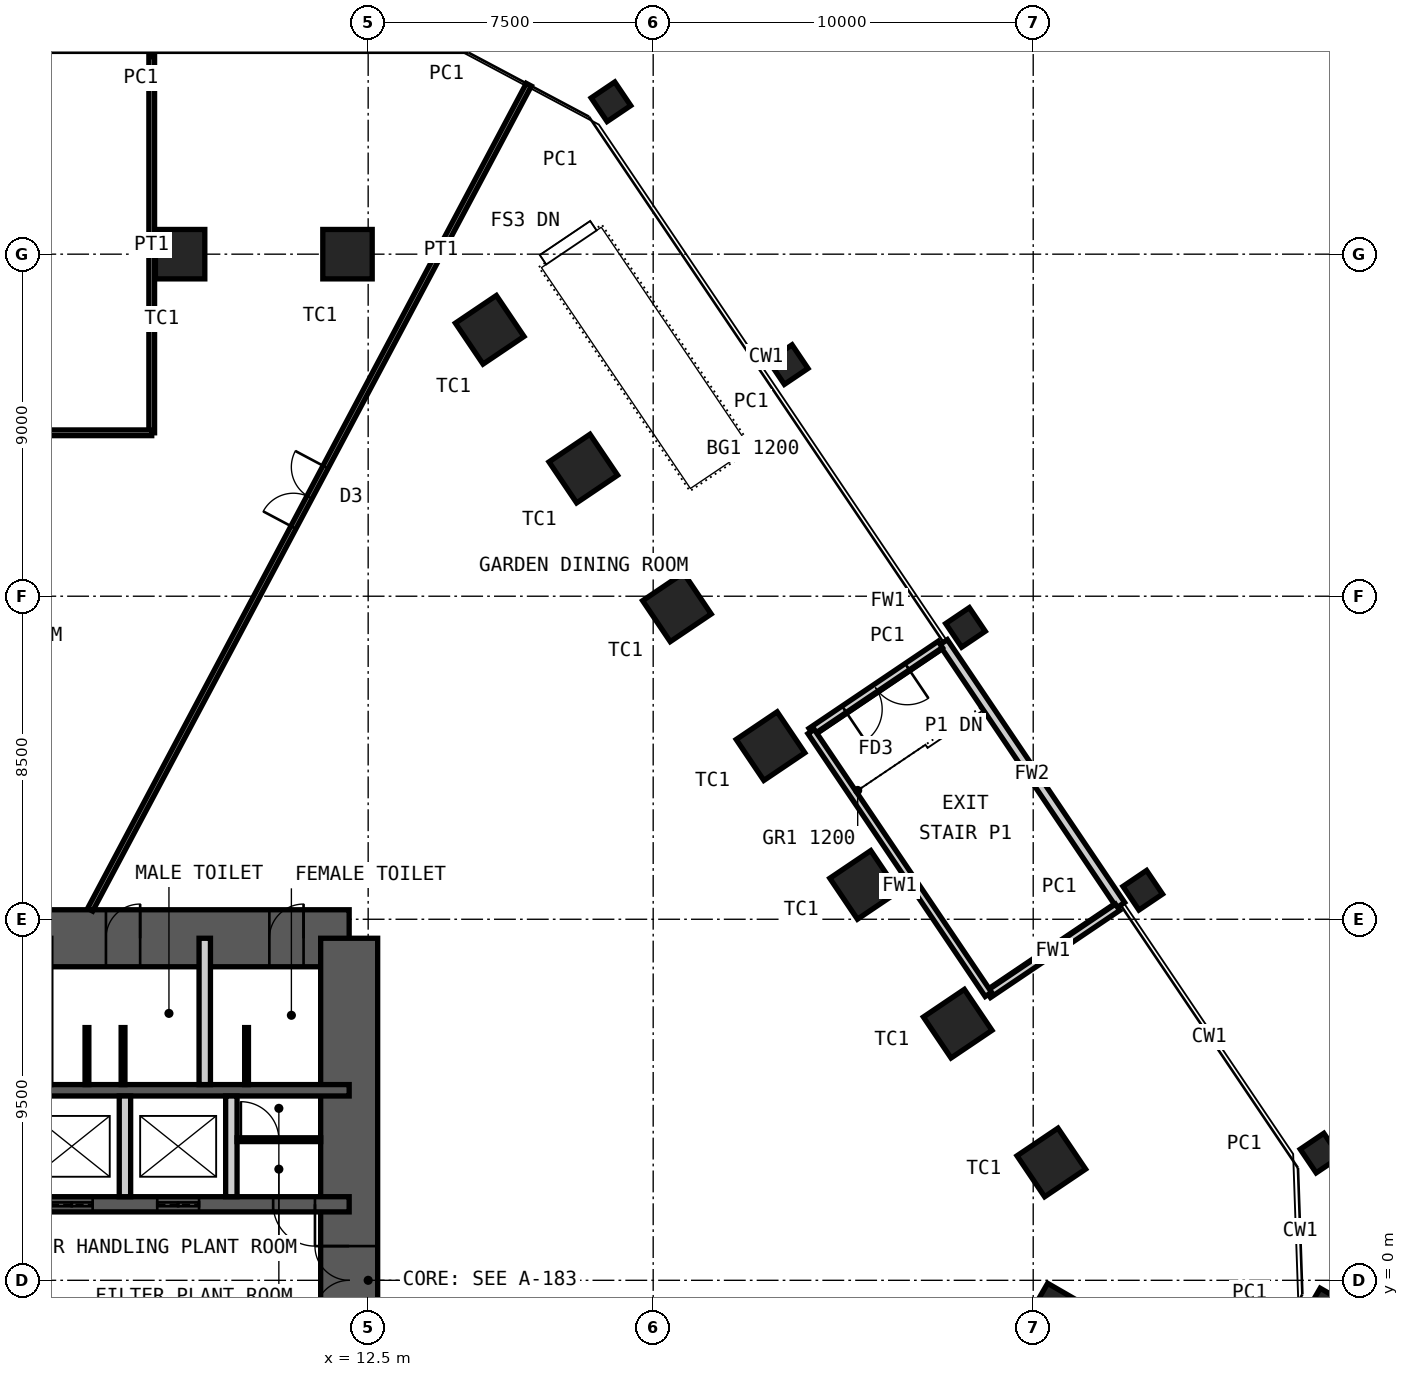
"""IFC4 building model, lengths in metres.
Left out: names, types, materials, properties, quantities, classifications, styles, units other than length and angle.
Written with IfcOpenShell. Run it as: python <this file> out.ifc"""

import sys

from ifc_helpers import new_model, si_unit, direction, frame, frame_2d, origin, origin_2d, place, context, subcontext, project, spatial, rectangle, hollow_rectangle, extrude, element, fill, save


model = new_model("IFC4")
c1 = context("Model", 3, precision=1e-05, world=origin(), true_north=direction((0.0, 1.0)))
c2 = subcontext(c1, "Body", "Model", "MODEL_VIEW")
j1 = project(units=[si_unit("LENGTHUNIT", "METRE"), si_unit("PLANEANGLEUNIT", "RADIAN")], contexts=[c1])
p1 = place(None, origin())
s1 = spatial("IfcSite", under=j1, at=p1, CompositionType="ELEMENT")
p2 = place(p1, origin())
s2 = spatial("IfcBuilding", under=s1, at=p2, CompositionType="ELEMENT")
p3 = place(p2, frame((0.0, 0.0, 12.0)))
s3 = spatial("IfcBuildingStorey", under=s2, at=p3, CompositionType="ELEMENT", Elevation=12.0)
for number, where, z_axis, x_axis in (
    (1, (7.552, 27.0, 0.0), (0.0, 0.0, 1.0), (-1.0, 0.0, 0.0)),
    (2, (11.956, 27.0, 0.0), (0.0, 0.0, 1.0), (-1.0, 0.0, 0.0)),
    (3, (15.698, 25.01, 0.0), (0.0, 0.0, 1.0), (-0.559, 0.829, 0.0)),
    (4, (18.161, 21.359, 0.0), (0.0, 0.0, 1.0), (-0.559, 0.829, 0.0)),
    (5, (20.624, 17.707, 0.0), (0.0, 0.0, 1.0), (-0.559, 0.829, 0.0)),
    (6, (23.087, 14.056, 0.0), (0.0, 0.0, 1.0), (-0.559, 0.829, 0.0)),
    (7, (25.55, 10.404, 0.0), (0.0, 0.0, 1.0), (-0.559, 0.829, 0.0)),
    (8, (28.013, 6.752, 0.0), (0.0, 0.0, 1.0), (-0.559, 0.829, 0.0)),
    (9, (30.476, 3.101, 0.0), (0.0, 0.0, 1.0), (-0.559, 0.829, 0.0)),
    (10, (30.618, -0.967, 0.0), (0.0, 0.0, 1.0), (0.5, 0.866, 0.0)),
):
    element("IfcColumn", number, at=place(p3, frame(where, z_axis=z_axis, x_axis=x_axis)), inside=s3, PredefinedType="COLUMN", context=c2, shape_type="SweptSolid", body=[
        extrude(hollow_rectangle(XDim=1.3, YDim=1.3, WallThickness=0.1, at=origin_2d()), origin(), (0.0, 0.0, 1.0), 5.0),
    ])
for number, where, z_axis, x_axis in (
    (11, (18.888, 31.01, 0.0), (0.0, 0.0, 1.0), (-0.559, 0.829, 0.0)),
    (12, (23.553, 24.095, 0.0), (0.0, 0.0, 1.0), (-0.559, 0.829, 0.0)),
    (13, (28.218, 17.179, 0.0), (0.0, 0.0, 1.0), (-0.559, 0.829, 0.0)),
    (14, (32.883, 10.263, 0.0), (0.0, 0.0, 1.0), (-0.559, 0.829, 0.0)),
    (15, (37.689, -0.72, 0.0), (0.0, 0.0, 1.0), (0.5, 0.866, 0.0)),
    (16, (37.547, 3.348, 0.0), (0.0, 0.0, 1.0), (-0.559, 0.829, 0.0)),
):
    element("IfcColumn", number, at=place(p3, frame(where, z_axis=z_axis, x_axis=x_axis)), inside=s3, PredefinedType="COLUMN", context=c2, shape_type="SweptSolid", body=[
        extrude(hollow_rectangle(XDim=0.75, YDim=0.75, WallThickness=0.036, at=origin_2d()), origin(), (0.0, 0.0, 1.0), 5.0),
    ])
p4 = place(p3, frame((-12.0, 9.0, 0.0), z_axis=(0.0, 0.0, 1.0), x_axis=(1.0, 0.0, 0.0)))
e17 = element("IfcWall", 17, at=p4, inside=s3, PredefinedType="SHEAR", context=c2, shape_type="SweptSolid", body=[
    extrude(rectangle(XDim=24.0, YDim=1.5, at=frame_2d((12.0, 0.0))), origin(), (0.0, 0.0, 1.0), 5.0),
])
p5 = place(p4, frame((10.4, 0.0, 0.0)))
e18 = element("IfcOpeningElement", 18, at=p5, cuts=e17, PredefinedType="OPENING", context=c2, shape_type="SweptSolid", body=[
    extrude(rectangle(XDim=1.0, YDim=2.1, at=frame_2d((0.5, 1.05))), frame((0.0, 0.76, 0.0), z_axis=(0.0, -1.0, 0.0), x_axis=(1.0, 0.0, 0.0)), (0.0, 0.0, 1.0), 1.52),
])
p6 = place(p4, frame((17.6, 0.0, 0.0)))
e19 = element("IfcOpeningElement", 19, at=p6, cuts=e17, PredefinedType="OPENING", context=c2, shape_type="SweptSolid", body=[
    extrude(rectangle(XDim=0.9, YDim=2.1, at=frame_2d((0.45, 1.05))), frame((0.0, 0.76, 0.0), z_axis=(0.0, -1.0, 0.0), x_axis=(1.0, 0.0, 0.0)), (0.0, 0.0, 1.0), 1.52),
])
p7 = place(p4, frame((21.9, 0.0, 0.0)))
e20 = element("IfcOpeningElement", 20, at=p7, cuts=e17, PredefinedType="OPENING", context=c2, shape_type="SweptSolid", body=[
    extrude(rectangle(XDim=0.9, YDim=2.1, at=frame_2d((0.45, 1.05))), frame((0.0, 0.76, 0.0), z_axis=(0.0, -1.0, 0.0), x_axis=(1.0, 0.0, 0.0)), (0.0, 0.0, 1.0), 1.52),
])
p8 = place(p3, frame((12.0, -9.0, 0.0), z_axis=(0.0, 0.0, 1.0), x_axis=(0.0, 1.0, 0.0)))
e21 = element("IfcWall", 21, at=p8, inside=s3, PredefinedType="SHEAR", context=c2, shape_type="SweptSolid", body=[
    extrude(rectangle(XDim=18.0, YDim=1.5, at=frame_2d((9.0, 0.0))), origin(), (0.0, 0.0, 1.0), 5.0),
])
p9 = place(p8, frame((8.1, 0.0, 0.0)))
e22 = element("IfcOpeningElement", 22, at=p9, cuts=e21, PredefinedType="OPENING", context=c2, shape_type="SweptSolid", body=[
    extrude(rectangle(XDim=1.8, YDim=2.1, at=frame_2d((0.9, 1.05))), frame((0.0, 0.76, 0.0), z_axis=(0.0, -1.0, 0.0), x_axis=(1.0, 0.0, 0.0)), (0.0, 0.0, 1.0), 1.52),
])
p10 = place(p3, frame((-12.0, 5.0, 0.0), z_axis=(0.0, 0.0, 1.0), x_axis=(1.0, 0.0, 0.0)))
e23 = element("IfcWall", 23, at=p10, inside=s3, PredefinedType="SHEAR", context=c2, shape_type="SweptSolid", body=[
    extrude(rectangle(XDim=24.0, YDim=0.3, at=frame_2d((12.0, 0.0))), origin(), (0.0, 0.0, 1.0), 5.0),
])
p11 = place(p3, frame((-12.0, 2.0, 0.0), z_axis=(0.0, 0.0, 1.0), x_axis=(1.0, 0.0, 0.0)))
e24 = element("IfcWall", 24, at=p11, inside=s3, PredefinedType="SHEAR", context=c2, shape_type="SweptSolid", body=[
    extrude(rectangle(XDim=24.0, YDim=0.4, at=frame_2d((12.0, 0.0))), origin(), (0.0, 0.0, 1.0), 5.0),
])
p12 = place(p11, frame((2.4, 0.0, 0.0)))
e25 = element("IfcOpeningElement", 25, at=p12, cuts=e24, PredefinedType="OPENING", context=c2, shape_type="SweptSolid", body=[
    extrude(rectangle(XDim=1.1, YDim=2.1, at=frame_2d((0.55, 1.05))), frame((0.0, 0.21, 0.0), z_axis=(0.0, -1.0, 0.0), x_axis=(1.0, 0.0, 0.0)), (0.0, 0.0, 1.0), 0.42),
])
p13 = place(p11, frame((22.0, 0.0, 0.0)))
e26 = element("IfcOpeningElement", 26, at=p13, cuts=e24, PredefinedType="OPENING", context=c2, shape_type="SweptSolid", body=[
    extrude(rectangle(XDim=1.1, YDim=2.1, at=frame_2d((0.55, 1.05))), frame((0.0, 0.21, 0.0), z_axis=(0.0, -1.0, 0.0), x_axis=(1.0, 0.0, 0.0)), (0.0, 0.0, 1.0), 0.42),
])
p14 = place(p11, frame((10.15, 0.0, 0.0)))
e27 = element("IfcOpeningElement", 27, at=p14, cuts=e24, PredefinedType="OPENING", context=c2, shape_type="SweptSolid", body=[
    extrude(rectangle(XDim=1.0, YDim=2.1, at=frame_2d((0.5, 1.05))), frame((0.0, 0.21, 0.0), z_axis=(0.0, -1.0, 0.0), x_axis=(1.0, 0.0, 0.0)), (0.0, 0.0, 1.0), 0.42),
])
p15 = place(p11, frame((6.7, 0.0, 0.0)))
e28 = element("IfcOpeningElement", 28, at=p15, cuts=e24, PredefinedType="OPENING", context=c2, shape_type="SweptSolid", body=[
    extrude(rectangle(XDim=1.4, YDim=2.4, at=frame_2d((0.7, 1.2))), frame((0.0, 0.21, 0.0), z_axis=(0.0, -1.0, 0.0), x_axis=(1.0, 0.0, 0.0)), (0.0, 0.0, 1.0), 0.42),
])
p16 = place(p11, frame((13.35, 0.0, 0.0)))
e29 = element("IfcOpeningElement", 29, at=p16, cuts=e24, PredefinedType="OPENING", context=c2, shape_type="SweptSolid", body=[
    extrude(rectangle(XDim=1.1, YDim=2.4, at=frame_2d((0.55, 1.2))), frame((0.0, 0.21, 0.0), z_axis=(0.0, -1.0, 0.0), x_axis=(1.0, 0.0, 0.0)), (0.0, 0.0, 1.0), 0.42),
])
p17 = place(p11, frame((16.15, 0.0, 0.0)))
e30 = element("IfcOpeningElement", 30, at=p17, cuts=e24, PredefinedType="OPENING", context=c2, shape_type="SweptSolid", body=[
    extrude(rectangle(XDim=1.1, YDim=2.4, at=frame_2d((0.55, 1.2))), frame((0.0, 0.21, 0.0), z_axis=(0.0, -1.0, 0.0), x_axis=(1.0, 0.0, 0.0)), (0.0, 0.0, 1.0), 0.42),
])
p18 = place(p11, frame((18.95, 0.0, 0.0)))
e31 = element("IfcOpeningElement", 31, at=p18, cuts=e24, PredefinedType="OPENING", context=c2, shape_type="SweptSolid", body=[
    extrude(rectangle(XDim=1.1, YDim=2.4, at=frame_2d((0.55, 1.2))), frame((0.0, 0.21, 0.0), z_axis=(0.0, -1.0, 0.0), x_axis=(1.0, 0.0, 0.0)), (0.0, 0.0, 1.0), 0.42),
])
p19 = place(p3, frame((8.2, 5.15, 0.0), z_axis=(0.0, 0.0, 1.0), x_axis=(0.0, 1.0, 0.0)))
e32 = element("IfcWall", 32, at=p19, inside=s3, PredefinedType="PARTITIONING", context=c2, shape_type="SweptSolid", body=[
    extrude(rectangle(XDim=3.85, YDim=0.3, at=frame_2d((1.925, 0.0))), origin(), (0.0, 0.0, 1.0), 4.78),
])
for number, where, z_axis, x_axis in (
    (33, (6.1, 2.2, 0.0), (0.0, 0.0, 1.0), (0.0, 1.0, 0.0)),
    (34, (8.9, 2.2, 0.0), (0.0, 0.0, 1.0), (0.0, 1.0, 0.0)),
):
    element("IfcWall", number, at=place(p3, frame(where, z_axis=z_axis, x_axis=x_axis)), inside=s3, PredefinedType="PARTITIONING", context=c2, shape_type="SweptSolid", body=[
        extrude(rectangle(XDim=2.65, YDim=0.3, at=frame_2d((1.325, 0.0))), origin(), (0.0, 0.0, 1.0), 4.78),
    ])
p20 = place(p3, frame((27.637, 16.788, 0.0), z_axis=(0.0, 0.0, 1.0), x_axis=(0.559196871021, -0.829034896395, 0.0)))
e35 = element("IfcWall", 35, at=p20, inside=s3, PredefinedType="SOLIDWALL", context=c2, shape_type="SweptSolid", body=[
    extrude(rectangle(XDim=8.342, YDim=0.25, at=frame_2d((4.171, 0.0))), origin(), (0.0, 0.0, 1.0), 4.7),
])
p21 = place(p3, frame((9.05, 3.7, 0.0), z_axis=(0.0, 0.0, 1.0), x_axis=(1.0, 0.0, 0.0)))
e36 = element("IfcWall", 36, at=p21, inside=s3, PredefinedType="PARTITIONING", context=c2, shape_type="SweptSolid", body=[
    extrude(rectangle(XDim=2.2, YDim=0.1, at=frame_2d((1.1, 0.0))), origin(), (0.0, 0.0, 1.0), 4.78),
])
p22 = place(p21, frame((0.1, 0.0, 0.0)))
e37 = element("IfcOpeningElement", 37, at=p22, cuts=e36, PredefinedType="OPENING", context=c2, shape_type="SweptSolid", body=[
    extrude(rectangle(XDim=1.0, YDim=2.4, at=frame_2d((0.5, 1.2))), frame((0.0, 0.06, 0.0), z_axis=(0.0, -1.0, 0.0), x_axis=(1.0, 0.0, 0.0)), (0.0, 0.0, 1.0), 0.12),
])
for number, where, z_axis, x_axis in (
    (38, (5.1, 5.15, 0.0), (0.0, 0.0, 1.0), (0.0, 1.0, 0.0)),
    (39, (6.05, 5.15, 0.0), (0.0, 0.0, 1.0), (0.0, 1.0, 0.0)),
    (40, (9.3, 5.15, 0.0), (0.0, 0.0, 1.0), (0.0, 1.0, 0.0)),
):
    element("IfcWall", number, at=place(p3, frame(where, z_axis=z_axis, x_axis=x_axis)), inside=s3, PredefinedType="PARTITIONING", context=c2, shape_type="SweptSolid", body=[
        extrude(rectangle(XDim=1.5, YDim=0.1, at=frame_2d((0.75, 0.0))), origin(), (0.0, 0.0, 1.0), 2.1),
    ])
p23 = place(p3, frame((6.805, 32.2, 0.0), z_axis=(0.0, 0.0, 1.0), x_axis=(0.0, -1.0, 0.0)))
e41 = element("IfcWall", 41, at=p23, inside=s3, PredefinedType="PARTITIONING", context=c2, shape_type="SweptSolid", body=[
    extrude(rectangle(XDim=9.9, YDim=0.15, at=frame_2d((4.95, 0.0))), origin(), (0.0, 0.0, 1.0), 3.6),
])
p24 = place(p3, frame((-9.879, 22.3, 0.0), z_axis=(0.0, 0.0, 1.0), x_axis=(1.0, 0.0, 0.0)))
e42 = element("IfcWall", 42, at=p24, inside=s3, PredefinedType="PARTITIONING", context=c2, shape_type="SweptSolid", body=[
    extrude(rectangle(XDim=16.684, YDim=0.15, at=frame_2d((8.342, 0.0))), origin(), (0.0, 0.0, 1.0), 4.7),
])
p25 = place(p24, frame((7.442, 0.0, 0.0)))
e43 = element("IfcOpeningElement", 43, at=p25, cuts=e42, PredefinedType="OPENING", context=c2, shape_type="SweptSolid", body=[
    extrude(rectangle(XDim=1.8, YDim=2.4, at=frame_2d((0.9, 1.2))), frame((0.0, 0.085, 0.0), z_axis=(0.0, -1.0, 0.0), x_axis=(1.0, 0.0, 0.0)), (0.0, 0.0, 1.0), 0.17),
])
p26 = place(p3, frame((5.184, 9.75, 0.0), z_axis=(0.0, 0.0, 1.0), x_axis=(0.469474147629, 0.882946218469, 0.0)))
e44 = element("IfcWall", 44, at=p26, inside=s3, PredefinedType="PARTITIONING", context=c2, shape_type="SweptSolid", body=[
    extrude(rectangle(XDim=24.588, YDim=0.15, at=frame_2d((12.294, 0.0))), origin(), (0.0, 0.0, 1.0), 4.7),
])
p27 = place(p26, frame((11.394, 0.0, 0.0)))
e45 = element("IfcOpeningElement", 45, at=p27, cuts=e44, PredefinedType="OPENING", context=c2, shape_type="SweptSolid", body=[
    extrude(rectangle(XDim=1.8, YDim=2.4, at=frame_2d((0.9, 1.2))), frame((0.0, 0.085, 0.0), z_axis=(0.0, -1.0, 0.0), x_axis=(1.0, 0.0, 0.0)), (0.0, 0.0, 1.0), 0.17),
])
p28 = place(p3, frame((27.555, 16.732, 0.0), z_axis=(0.0, 0.0, 1.0), x_axis=(-0.829042598749, -0.55918545176, 0.0)))
e46 = element("IfcWall", 46, at=p28, inside=s3, PredefinedType="PARTITIONING", context=c2, shape_type="SweptSolid", body=[
    extrude(rectangle(XDim=4.1, YDim=0.2, at=frame_2d((2.05, 0.0))), origin(), (0.0, 0.0, 1.0), 4.7),
])
p29 = place(p28, frame((1.05, 0.0, 0.0)))
e47 = element("IfcOpeningElement", 47, at=p29, cuts=e46, PredefinedType="OPENING", context=c2, shape_type="SweptSolid", body=[
    extrude(rectangle(XDim=2.0, YDim=2.4, at=frame_2d((1.0, 1.2))), frame((0.0, 0.11, 0.0), z_axis=(0.0, -1.0, 0.0), x_axis=(1.0, 0.0, 0.0)), (0.0, 0.0, 1.0), 0.22),
])
p30 = place(p3, frame((32.219, 9.816, 0.0), z_axis=(0.0, 0.0, 1.0), x_axis=(-0.829070202957, -0.559144523865, 0.0)))
e48 = element("IfcWall", 48, at=p30, inside=s3, PredefinedType="PARTITIONING", context=c2, shape_type="SweptSolid", body=[
    extrude(rectangle(XDim=4.1, YDim=0.2, at=frame_2d((2.05, 0.0))), origin(), (0.0, 0.0, 1.0), 4.7),
])
p31 = place(p3, frame((24.156, 14.439, 0.0), z_axis=(0.0, 0.0, 1.0), x_axis=(0.559190323649, -0.829039312661, 0.0)))
e49 = element("IfcWall", 49, at=p31, inside=s3, PredefinedType="PARTITIONING", context=c2, shape_type="SweptSolid", body=[
    extrude(rectangle(XDim=8.342, YDim=0.2, at=frame_2d((4.171, 0.0))), origin(), (0.0, 0.0, 1.0), 4.7),
])
p32 = place(p6, origin())
e50 = element("IfcDoor", 50, at=p32, inside=s3, OperationType="SINGLE_SWING_LEFT", PredefinedType="DOOR", context=c2, shape_type="SweptSolid", body=[
    extrude(rectangle(XDim=0.9, YDim=2.1, at=frame_2d((0.45, 1.05))), frame((0.0, 0.025, 0.0), z_axis=(0.0, -1.0, 0.0), x_axis=(1.0, 0.0, 0.0)), (0.0, 0.0, 1.0), 0.05),
])
fill(e19, e50)
p33 = place(p7, origin())
e51 = element("IfcDoor", 51, at=p33, inside=s3, OperationType="SINGLE_SWING_LEFT", PredefinedType="DOOR", context=c2, shape_type="SweptSolid", body=[
    extrude(rectangle(XDim=0.9, YDim=2.1, at=frame_2d((0.45, 1.05))), frame((0.0, 0.025, 0.0), z_axis=(0.0, -1.0, 0.0), x_axis=(1.0, 0.0, 0.0)), (0.0, 0.0, 1.0), 0.05),
])
fill(e20, e51)
p34 = place(p13, origin())
e52 = element("IfcDoor", 52, at=p34, inside=s3, OperationType="SINGLE_SWING_RIGHT", PredefinedType="DOOR", context=c2, shape_type="SweptSolid", body=[
    extrude(rectangle(XDim=1.1, YDim=2.1, at=frame_2d((0.55, 1.05))), frame((0.0, 0.025, 0.0), z_axis=(0.0, -1.0, 0.0), x_axis=(1.0, 0.0, 0.0)), (0.0, 0.0, 1.0), 0.05),
])
fill(e26, e52)
p35 = place(p9, origin())
e53 = element("IfcDoor", 53, at=p35, inside=s3, OperationType="DOUBLE_DOOR_DOUBLE_SWING", PredefinedType="DOOR", context=c2, shape_type="SweptSolid", body=[
    extrude(rectangle(XDim=1.8, YDim=2.1, at=frame_2d((0.9, 1.05))), frame((0.0, 0.025, 0.0), z_axis=(0.0, -1.0, 0.0), x_axis=(1.0, 0.0, 0.0)), (0.0, 0.0, 1.0), 0.05),
])
fill(e22, e53)
p36 = place(p17, origin())
e54 = element("IfcDoor", 54, at=p36, inside=s3, OperationType="DOUBLE_DOOR_SLIDING", PredefinedType="DOOR", context=c2, shape_type="SweptSolid", body=[
    extrude(rectangle(XDim=1.1, YDim=2.4, at=frame_2d((0.55, 1.2))), frame((0.0, 0.025, 0.0), z_axis=(0.0, -1.0, 0.0), x_axis=(1.0, 0.0, 0.0)), (0.0, 0.0, 1.0), 0.05),
])
fill(e30, e54)
p37 = place(p18, origin())
e55 = element("IfcDoor", 55, at=p37, inside=s3, OperationType="DOUBLE_DOOR_SLIDING", PredefinedType="DOOR", context=c2, shape_type="SweptSolid", body=[
    extrude(rectangle(XDim=1.1, YDim=2.4, at=frame_2d((0.55, 1.2))), frame((0.0, 0.025, 0.0), z_axis=(0.0, -1.0, 0.0), x_axis=(1.0, 0.0, 0.0)), (0.0, 0.0, 1.0), 0.05),
])
fill(e31, e55)
p38 = place(p22, origin())
e56 = element("IfcDoor", 56, at=p38, inside=s3, OperationType="SINGLE_SWING_RIGHT", PredefinedType="DOOR", context=c2, shape_type="SweptSolid", body=[
    extrude(rectangle(XDim=1.0, YDim=2.4, at=frame_2d((0.5, 1.2))), frame((0.0, 0.025, 0.0), z_axis=(0.0, -1.0, 0.0), x_axis=(1.0, 0.0, 0.0)), (0.0, 0.0, 1.0), 0.05),
])
fill(e37, e56)
p39 = place(p27, origin())
e57 = element("IfcDoor", 57, at=p39, inside=s3, OperationType="DOUBLE_DOOR_DOUBLE_SWING", PredefinedType="DOOR", context=c2, shape_type="SweptSolid", body=[
    extrude(rectangle(XDim=1.8, YDim=2.4, at=frame_2d((0.9, 1.2))), frame((0.0, 0.025, 0.0), z_axis=(0.0, -1.0, 0.0), x_axis=(1.0, 0.0, 0.0)), (0.0, 0.0, 1.0), 0.05),
])
fill(e45, e57)
p40 = place(p29, origin())
e58 = element("IfcDoor", 58, at=p40, inside=s3, OperationType="DOUBLE_DOOR_DOUBLE_SWING", PredefinedType="DOOR", context=c2, shape_type="SweptSolid", body=[
    extrude(rectangle(XDim=2.0, YDim=2.4, at=frame_2d((1.0, 1.2))), frame((0.0, 0.025, 0.0), z_axis=(0.0, -1.0, 0.0), x_axis=(1.0, 0.0, 0.0)), (0.0, 0.0, 1.0), 0.05),
])
fill(e47, e58)
save(model, sys.argv[1])
